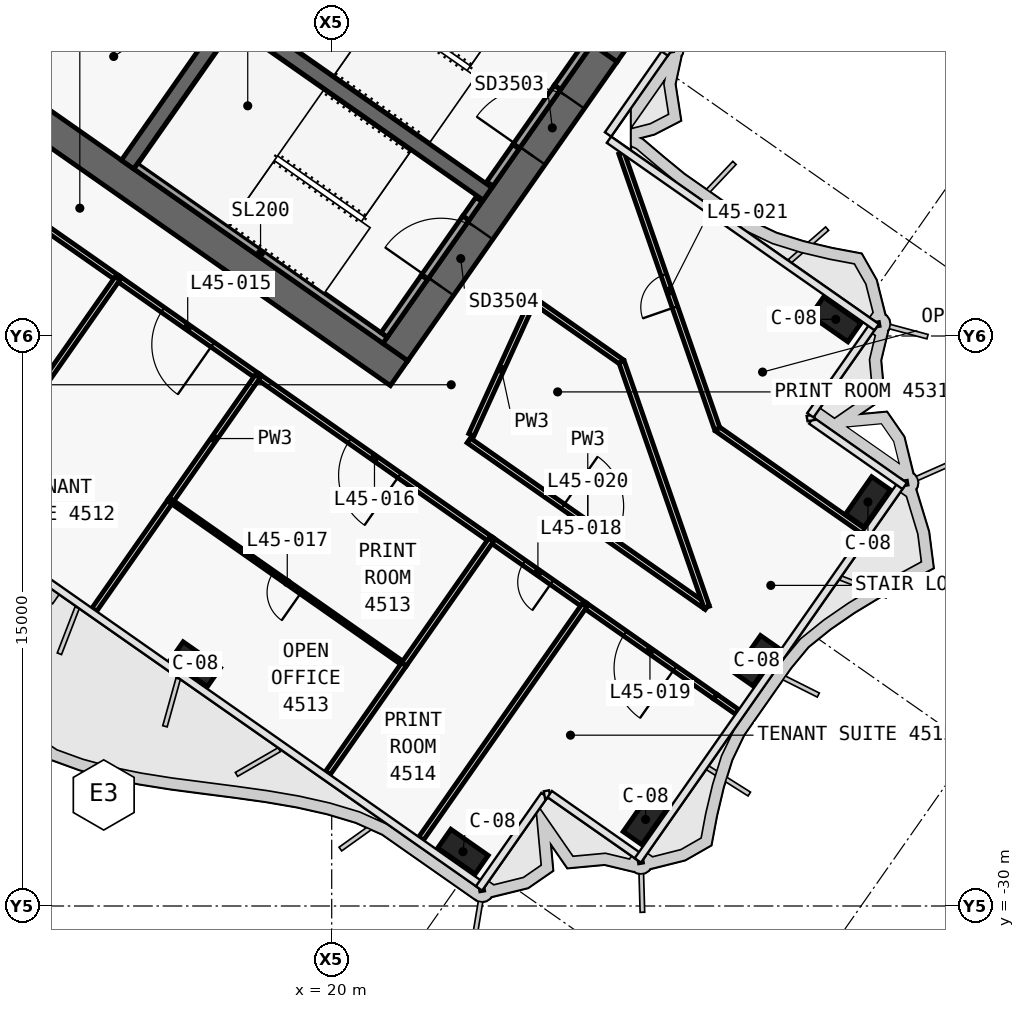
"""IFC4 building model, lengths in metres.
Left out: names, types, materials, properties, quantities, classifications, styles, units other than length and angle.
Written with IfcOpenShell. Run it as: python <this file> out.ifc"""

import sys

from ifc_helpers import new_model, si_unit, direction, frame, frame_2d, origin, origin_2d, place, context, subcontext, project, spatial, polyline, rectangle, outline, extrude, element, fill, save


model = new_model("IFC4")
c1 = context("Model", 3, precision=1e-05, world=origin(), true_north=direction((0.0, 1.0)))
c2 = subcontext(c1, "Body", "Model", "MODEL_VIEW")
j1 = project(units=[si_unit("LENGTHUNIT", "METRE"), si_unit("PLANEANGLEUNIT", "RADIAN")], contexts=[c1])
p1 = place(None, origin())
s1 = spatial("IfcSite", under=j1, at=p1, CompositionType="ELEMENT")
p2 = place(p1, origin())
s2 = spatial("IfcBuilding", under=s1, at=p2, CompositionType="ELEMENT")
p3 = place(p2, frame((0.0, 0.0, 194.4)))
s3 = spatial("IfcBuildingStorey", under=s2, at=p3, CompositionType="ELEMENT", Elevation=194.4)
p4 = place(p3, frame((-0.029, 11.984, 0.0), z_axis=(0.0, 0.0, 1.0), x_axis=(0.819151382952, -0.573577380837, 0.0)))
e1 = element("IfcWall", 1, at=p4, inside=s3, PredefinedType="SHEAR", context=c2, shape_type="SweptSolid", body=[
    extrude(outline(polyline([(33.898, 0.4), (-0.0, 0.4), (0.56, -0.4), (33.898, -0.4), (33.898, 0.4)])), origin(), (0.0, 0.0, 1.0), 3.9),
])
p5 = place(p3, frame((-0.029, -0.712, 0.0), z_axis=(0.0, 0.0, 1.0), x_axis=(0.819151758019, -0.573576845187, 0.0)))
e2 = element("IfcWall", 2, at=p5, inside=s3, PredefinedType="SHEAR", context=c2, shape_type="SweptSolid", body=[
    extrude(outline(polyline([(26.616, 0.4), (-0.0, 0.4), (0.56, -0.4), (26.616, -0.4), (26.616, 0.4)])), origin(), (0.0, 0.0, 1.0), 3.9),
])
p6 = place(p5, frame((6.666, 0.0, 0.0)))
e3 = element("IfcOpeningElement", 3, at=p6, cuts=e2, PredefinedType="OPENING", context=c2, shape_type="SweptSolid", body=[
    extrude(rectangle(XDim=1.5, YDim=2.1, at=frame_2d((0.75, 1.05))), frame((0.0, 0.41, 0.0), z_axis=(0.0, -1.0, 0.0), x_axis=(1.0, 0.0, 0.0)), (0.0, 0.0, 1.0), 0.82),
])
p7 = place(p5, frame((12.366, 0.0, 0.0)))
e4 = element("IfcOpeningElement", 4, at=p7, cuts=e2, PredefinedType="OPENING", context=c2, shape_type="SweptSolid", body=[
    extrude(rectangle(XDim=1.5, YDim=2.1, at=frame_2d((0.75, 1.05))), frame((0.0, 0.41, 0.0), z_axis=(0.0, -1.0, 0.0), x_axis=(1.0, 0.0, 0.0)), (0.0, 0.0, 1.0), 0.82),
])
p8 = place(p3, frame((21.675, -15.421, 0.0), z_axis=(0.0, 0.0, 1.0), x_axis=(0.573581815061, 0.819148278049, 0.0)))
e5 = element("IfcWall", 5, at=p8, inside=s3, PredefinedType="SHEAR", context=c2, shape_type="SweptSolid", body=[
    extrude(outline(polyline([(9.6, 0.4), (0.0, 0.4), (0.0, -0.4), (9.6, -0.4), (9.6, 0.4)])), origin(), (0.0, 0.0, 1.0), 3.9),
])
p9 = place(p8, frame((6.3, 0.0, 0.0)))
e6 = element("IfcOpeningElement", 6, at=p9, cuts=e5, PredefinedType="OPENING", context=c2, shape_type="SweptSolid", body=[
    extrude(rectangle(XDim=1.8, YDim=2.1, at=frame_2d((0.9, 1.05))), frame((0.0, 0.41, 0.0), z_axis=(0.0, -1.0, 0.0), x_axis=(1.0, 0.0, 0.0)), (0.0, 0.0, 1.0), 0.82),
])
p10 = place(p8, frame((2.1, 0.0, 0.0)))
e7 = element("IfcOpeningElement", 7, at=p10, cuts=e5, PredefinedType="OPENING", context=c2, shape_type="SweptSolid", body=[
    extrude(rectangle(XDim=1.8, YDim=2.1, at=frame_2d((0.9, 1.05))), frame((0.0, 0.41, 0.0), z_axis=(0.0, -1.0, 0.0), x_axis=(1.0, 0.0, 0.0)), (0.0, 0.0, 1.0), 0.82),
])
p11 = place(p3, frame((14.63, -10.488, 0.0), z_axis=(0.0, 0.0, 1.0), x_axis=(0.573611936273, 0.819127185829, 0.0)))
e8 = element("IfcWall", 8, at=p11, inside=s3, PredefinedType="SHEAR", context=c2, shape_type="SweptSolid", body=[
    extrude(outline(polyline([(0.0, 0.2), (0.0, -0.2), (4.6, -0.2), (4.6, 0.2), (0.0, 0.2)])), origin(), (0.0, 0.0, 1.0), 3.9),
])
p12 = place(p3, frame((2.638, 3.768, 0.0), z_axis=(0.0, 0.0, 1.0), x_axis=(0.81915267502, -0.573575535572, 0.0)))
e9 = element("IfcWall", 9, at=p12, inside=s3, PredefinedType="SHEAR", context=c2, shape_type="SweptSolid", body=[
    extrude(outline(polyline([(0.0, 0.2), (0.0, -0.2), (26.2, -0.2), (26.2, 0.2), (0.0, 0.2)])), origin(), (0.0, 0.0, 1.0), 3.9),
])
p13 = place(p12, frame((9.637, 0.0, 0.0)))
e10 = element("IfcOpeningElement", 10, at=p13, cuts=e9, PredefinedType="OPENING", context=c2, shape_type="SweptSolid", body=[
    extrude(rectangle(XDim=1.2, YDim=2.1, at=frame_2d((0.6, 1.05))), frame((0.0, 0.21, 0.0), z_axis=(0.0, -1.0, 0.0), x_axis=(1.0, 0.0, 0.0)), (0.0, 0.0, 1.0), 0.42),
])
p14 = place(p12, frame((11.812, 0.0, 0.0)))
e11 = element("IfcOpeningElement", 11, at=p14, cuts=e9, PredefinedType="OPENING", context=c2, shape_type="SweptSolid", body=[
    extrude(rectangle(XDim=1.2, YDim=2.1, at=frame_2d((0.6, 1.05))), frame((0.0, 0.21, 0.0), z_axis=(0.0, -1.0, 0.0), x_axis=(1.0, 0.0, 0.0)), (0.0, 0.0, 1.0), 0.42),
])
p15 = place(p12, frame((13.988, 0.0, 0.0)))
e12 = element("IfcOpeningElement", 12, at=p15, cuts=e9, PredefinedType="OPENING", context=c2, shape_type="SweptSolid", body=[
    extrude(rectangle(XDim=1.2, YDim=2.1, at=frame_2d((0.6, 1.05))), frame((0.0, 0.21, 0.0), z_axis=(0.0, -1.0, 0.0), x_axis=(1.0, 0.0, 0.0)), (0.0, 0.0, 1.0), 0.42),
])
p16 = place(p12, frame((16.262, 0.0, 0.0)))
e13 = element("IfcOpeningElement", 13, at=p16, cuts=e9, PredefinedType="OPENING", context=c2, shape_type="SweptSolid", body=[
    extrude(rectangle(XDim=1.0, YDim=2.1, at=frame_2d((0.5, 1.05))), frame((0.0, 0.21, 0.0), z_axis=(0.0, -1.0, 0.0), x_axis=(1.0, 0.0, 0.0)), (0.0, 0.0, 1.0), 0.42),
])
for number, where, z_axis, x_axis in (
    (14, (16.41, -23.637, 0.0), (0.0, 0.0, 1.0), (0.819, -0.574, 0.0)),
    (15, (23.455, -28.57, 0.0), (0.0, 0.0, 1.0), (0.819, -0.574, 0.0)),
    (16, (33.263, -14.562, 0.0), (0.0, 0.0, 1.0), (0.819, -0.574, 0.0)),
    (17, (28.26, -27.723, 0.0), (0.0, 0.0, 1.0), (0.574, 0.819, 0.0)),
    (18, (31.185, -23.545, 0.0), (0.0, 0.0, 1.0), (0.574, 0.819, 0.0)),
    (19, (34.11, -19.367, 0.0), (0.0, 0.0, 1.0), (0.574, 0.819, 0.0)),
):
    element("IfcColumn", number, at=place(p3, frame(where, z_axis=z_axis, x_axis=x_axis)), inside=s3, PredefinedType="COLUMN", context=c2, shape_type="SweptSolid", body=[
        extrude(rectangle(XDim=1.2, YDim=0.6, at=origin_2d()), origin(), (0.0, 0.0, 1.0), 3.9),
    ])
p17 = place(p3, frame((24.162, -10.998, 0.0), z_axis=(0.0, 0.0, 1.0), x_axis=(0.573612502218, 0.819126789514, 0.0)))
e20 = element("IfcWall", 20, at=p17, inside=s3, PredefinedType="SOLIDWALL", context=c2, shape_type="SweptSolid", body=[
    extrude(rectangle(XDim=1.2, YDim=0.2, at=frame_2d((0.6, 0.0))), origin(), (0.0, 0.0, 1.0), 3.62),
])
p18 = place(p3, frame((25.94, -8.458, 0.0), z_axis=(0.0, 0.0, 1.0), x_axis=(0.573619628835, 0.819121798889, 0.0)))
e21 = element("IfcWall", 21, at=p18, inside=s3, PredefinedType="SOLIDWALL", context=c2, shape_type="SweptSolid", body=[
    extrude(rectangle(XDim=1.25, YDim=0.2, at=frame_2d((0.625, 0.0))), origin(), (0.0, 0.0, 1.0), 3.62),
])
p19 = place(p3, frame((24.85, -10.014, 2.15), z_axis=(0.0, 0.0, 1.0), x_axis=(0.573505465124, 0.819201734296, 0.0)))
e22 = element("IfcWall", 22, at=p19, inside=s3, PredefinedType="SOLIDWALL", context=c2, shape_type="SweptSolid", body=[
    extrude(rectangle(XDim=1.9, YDim=0.2, at=frame_2d((0.95, 0.0))), origin(), (0.0, 0.0, 1.0), 1.47),
])
p20 = place(p3, frame((14.851, -10.521, 0.0), z_axis=(0.0, 0.0, 1.0), x_axis=(0.819141584393, -0.57359137434, 0.0)))
e23 = element("IfcWall", 23, at=p20, inside=s3, PredefinedType="SOLIDWALL", context=c2, shape_type="SweptSolid", body=[
    extrude(rectangle(XDim=8.0, YDim=0.2, at=frame_2d((4.0, 0.0))), origin(), (0.0, 0.0, 1.0), 3.62),
])
p21 = place(p3, frame((21.38, -14.97, 0.0), z_axis=(0.0, 0.0, 1.0), x_axis=(0.573559770908, 0.819163713305, 0.0)))
e24 = element("IfcWall", 24, at=p21, inside=s3, PredefinedType="SOLIDWALL", context=c2, shape_type="SweptSolid", body=[
    extrude(rectangle(XDim=1.85, YDim=0.2, at=frame_2d((0.925, 0.0))), origin(), (0.0, 0.0, 1.0), 3.62),
])
p22 = place(p3, frame((23.531, -11.898, 0.0), z_axis=(0.0, 0.0, 1.0), x_axis=(0.573708088123, 0.819059844958, 0.0)))
e25 = element("IfcWall", 25, at=p22, inside=s3, PredefinedType="SOLIDWALL", context=c2, shape_type="SweptSolid", body=[
    extrude(rectangle(XDim=0.6, YDim=0.2, at=frame_2d((0.3, 0.0))), origin(), (0.0, 0.0, 1.0), 3.62),
])
p23 = place(p3, frame((22.441, -13.455, 2.15), z_axis=(0.0, 0.0, 1.0), x_axis=(0.573591692345, 0.819141361715, 0.0)))
e26 = element("IfcWall", 26, at=p23, inside=s3, PredefinedType="SOLIDWALL", context=c2, shape_type="SweptSolid", body=[
    extrude(rectangle(XDim=1.9, YDim=0.2, at=frame_2d((0.95, 0.0))), origin(), (0.0, 0.0, 1.0), 1.47),
])
p24 = place(p3, frame((23.605, -17.749, 0.0), z_axis=(0.0, 0.0, 1.0), x_axis=(0.819164438106, -0.57355873574, 0.0)))
e27 = element("IfcWall", 27, at=p24, inside=s3, PredefinedType="PARTITIONING", context=c2, shape_type="SweptSolid", body=[
    extrude(rectangle(XDim=7.649, YDim=0.15, at=frame_2d((3.825, 0.0))), origin(), (0.0, 0.0, 1.0), 3.0),
])
p25 = place(p24, frame((3.024, 0.0, 0.0)))
e28 = element("IfcOpeningElement", 28, at=p25, cuts=e27, PredefinedType="OPENING", context=c2, shape_type="SweptSolid", body=[
    extrude(rectangle(XDim=1.6, YDim=2.1, at=frame_2d((0.8, 1.05))), frame((0.0, 0.085, 0.0), z_axis=(0.0, -1.0, 0.0), x_axis=(1.0, 0.0, 0.0)), (0.0, 0.0, 1.0), 0.17),
])
p26 = place(p3, frame((14.369, -13.479, 0.0), z_axis=(0.0, 0.0, 1.0), x_axis=(-0.819154371039, 0.573573113393, 0.0)))
e29 = element("IfcWall", 29, at=p26, inside=s3, PredefinedType="PARTITIONING", context=c2, shape_type="SweptSolid", body=[
    extrude(rectangle(XDim=10.502, YDim=0.15, at=frame_2d((5.251, 0.0))), origin(), (0.0, 0.0, 1.0), 3.0),
])
p27 = place(p26, frame((4.451, 0.0, 0.0)))
e30 = element("IfcOpeningElement", 30, at=p27, cuts=e29, PredefinedType="OPENING", context=c2, shape_type="SweptSolid", body=[
    extrude(rectangle(XDim=1.6, YDim=2.1, at=frame_2d((0.8, 1.05))), frame((0.0, 0.085, 0.0), z_axis=(0.0, -1.0, 0.0), x_axis=(1.0, 0.0, 0.0)), (0.0, 0.0, 1.0), 0.17),
])
p28 = place(p3, frame((18.055, -16.061, 0.0), z_axis=(0.0, 0.0, 1.0), x_axis=(-0.819183534257, 0.573531461389, 0.0)))
e31 = element("IfcWall", 31, at=p28, inside=s3, PredefinedType="PARTITIONING", context=c2, shape_type="SweptSolid", body=[
    extrude(rectangle(XDim=4.504, YDim=0.15, at=frame_2d((2.252, 0.0))), origin(), (0.0, 0.0, 1.0), 3.62),
])
p29 = place(p28, frame((1.452, 0.0, 0.0)))
e32 = element("IfcOpeningElement", 32, at=p29, cuts=e31, PredefinedType="OPENING", context=c2, shape_type="SweptSolid", body=[
    extrude(rectangle(XDim=1.6, YDim=2.1, at=frame_2d((0.8, 1.05))), frame((0.0, 0.085, 0.0), z_axis=(0.0, -1.0, 0.0), x_axis=(1.0, 0.0, 0.0)), (0.0, 0.0, 1.0), 0.17),
])
p30 = place(p3, frame((24.199, -20.362, 0.0), z_axis=(0.0, 0.0, 1.0), x_axis=(-0.819164661457, 0.573558416746, 0.0)))
e33 = element("IfcWall", 33, at=p30, inside=s3, PredefinedType="PARTITIONING", context=c2, shape_type="SweptSolid", body=[
    extrude(rectangle(XDim=7.504, YDim=0.15, at=frame_2d((3.752, 0.0))), origin(), (0.0, 0.0, 1.0), 3.0),
])
p31 = place(p30, frame((2.952, 0.0, 0.0)))
e34 = element("IfcOpeningElement", 34, at=p31, cuts=e33, PredefinedType="OPENING", context=c2, shape_type="SweptSolid", body=[
    extrude(rectangle(XDim=1.6, YDim=2.1, at=frame_2d((0.8, 1.05))), frame((0.0, 0.085, 0.0), z_axis=(0.0, -1.0, 0.0), x_axis=(1.0, 0.0, 0.0)), (0.0, 0.0, 1.0), 0.17),
])
p32 = place(p3, frame((26.656, -22.083, 0.0), z_axis=(0.0, 0.0, 1.0), x_axis=(-0.819155556475, 0.573571420397, 0.0)))
e35 = element("IfcWall", 35, at=p32, inside=s3, PredefinedType="PARTITIONING", context=c2, shape_type="SweptSolid", body=[
    extrude(rectangle(XDim=3.004, YDim=0.15, at=frame_2d((1.502, 0.0))), origin(), (0.0, 0.0, 1.0), 3.62),
])
p33 = place(p32, frame((1.052, 0.0, 0.0)))
e36 = element("IfcOpeningElement", 36, at=p33, cuts=e35, PredefinedType="OPENING", context=c2, shape_type="SweptSolid", body=[
    extrude(rectangle(XDim=0.9, YDim=2.1, at=frame_2d((0.45, 1.05))), frame((0.0, 0.085, 0.0), z_axis=(0.0, -1.0, 0.0), x_axis=(1.0, 0.0, 0.0)), (0.0, 0.0, 1.0), 0.17),
])
p34 = place(p3, frame((30.095, -24.491, 0.0), z_axis=(0.0, 0.0, 1.0), x_axis=(-0.819130917785, 0.573606606943, 0.0)))
e37 = element("IfcWall", 37, at=p34, inside=s3, PredefinedType="PARTITIONING", context=c2, shape_type="SweptSolid", body=[
    extrude(rectangle(XDim=4.202, YDim=0.15, at=frame_2d((2.101, 0.0))), origin(), (0.0, 0.0, 1.0), 3.0),
])
p35 = place(p34, frame((1.301, 0.0, 0.0)))
e38 = element("IfcOpeningElement", 38, at=p35, cuts=e37, PredefinedType="OPENING", context=c2, shape_type="SweptSolid", body=[
    extrude(rectangle(XDim=1.6, YDim=2.1, at=frame_2d((0.8, 1.05))), frame((0.0, 0.085, 0.0), z_axis=(0.0, -1.0, 0.0), x_axis=(1.0, 0.0, 0.0)), (0.0, 0.0, 1.0), 0.17),
])
p36 = place(p3, frame((33.996, -20.141, 0.0), z_axis=(0.0, 0.0, 1.0), x_axis=(-0.819151387458, 0.573577374402, 0.0)))
e39 = element("IfcWall", 39, at=p36, inside=s3, PredefinedType="PARTITIONING", context=c2, shape_type="SweptSolid", body=[
    extrude(rectangle(XDim=4.7, YDim=0.15, at=frame_2d((2.35, 0.0))), origin(), (0.0, 0.0, 1.0), 2.9),
])
p37 = place(p3, frame((30.146, -17.445, 0.0), z_axis=(0.0, 0.0, 1.0), x_axis=(-0.328073138075, 0.944652325501, 0.0)))
e40 = element("IfcWall", 40, at=p37, inside=s3, PredefinedType="PARTITIONING", context=c2, shape_type="SweptSolid", body=[
    extrude(rectangle(XDim=7.682, YDim=0.15, at=frame_2d((3.841, 0.0))), origin(), (0.0, 0.0, 1.0), 3.0),
])
p38 = place(p37, frame((3.391, 0.0, 0.0)))
e41 = element("IfcOpeningElement", 41, at=p38, cuts=e40, PredefinedType="OPENING", context=c2, shape_type="SweptSolid", body=[
    extrude(rectangle(XDim=0.9, YDim=2.1, at=frame_2d((0.45, 1.05))), frame((0.0, 0.085, 0.0), z_axis=(0.0, -1.0, 0.0), x_axis=(1.0, 0.0, 0.0)), (0.0, 0.0, 1.0), 0.17),
])
p39 = place(p3, frame((25.311, -14.061, 0.0), z_axis=(0.0, 0.0, 1.0), x_axis=(0.819179203532, -0.573537646978, 0.0)))
e42 = element("IfcWall", 42, at=p39, inside=s3, PredefinedType="PARTITIONING", context=c2, shape_type="SweptSolid", body=[
    extrude(rectangle(XDim=2.829, YDim=0.15, at=frame_2d((1.414, 0.0))), origin(), (0.0, 0.0, 1.0), 3.62),
])
p40 = place(p3, frame((27.628, -15.683, 0.0), z_axis=(0.0, 0.0, 1.0), x_axis=(0.328031182776, -0.944666895327, 0.0)))
e43 = element("IfcWall", 43, at=p40, inside=s3, PredefinedType="PARTITIONING", context=c2, shape_type="SweptSolid", body=[
    extrude(rectangle(XDim=6.83, YDim=0.15, at=frame_2d((3.415, 0.0))), origin(), (0.0, 0.0, 1.0), 3.0),
])
p41 = place(p3, frame((23.675, -17.601, 0.0), z_axis=(0.0, 0.0, 1.0), x_axis=(0.414941649999, 0.909848024176, 0.0)))
e44 = element("IfcWall", 44, at=p41, inside=s3, PredefinedType="PARTITIONING", context=c2, shape_type="SweptSolid", body=[
    extrude(rectangle(XDim=3.795, YDim=0.15, at=frame_2d((1.897, 0.0))), origin(), (0.0, 0.0, 1.0), 3.62),
])
p42 = place(p3, frame((14.367, -13.479, 0.0), z_axis=(0.0, 0.0, 1.0), x_axis=(-0.573598101901, -0.81913687348, 0.0)))
e45 = element("IfcWall", 45, at=p42, inside=s3, PredefinedType="PARTITIONING", context=c2, shape_type="SweptSolid", body=[
    extrude(rectangle(XDim=3.5, YDim=0.15, at=frame_2d((1.75, 0.0))), origin(), (0.0, 0.0, 1.0), 3.62),
])
p43 = place(p3, frame((15.76, -19.335, 0.0), z_axis=(0.0, 0.0, 1.0), x_axis=(-0.573607413343, -0.819130353093, 0.0)))
e46 = element("IfcWall", 46, at=p43, inside=s3, PredefinedType="PARTITIONING", context=c2, shape_type="SweptSolid", body=[
    extrude(rectangle(XDim=3.501, YDim=0.15, at=frame_2d((1.75, 0.0))), origin(), (0.0, 0.0, 1.0), 2.9),
])
p44 = place(p3, frame((18.054, -16.06, 0.0), z_axis=(0.0, 0.0, 1.0), x_axis=(-0.573589265117, -0.819143061341, 0.0)))
e47 = element("IfcWall", 47, at=p44, inside=s3, PredefinedType="PARTITIONING", context=c2, shape_type="SweptSolid", body=[
    extrude(rectangle(XDim=4.002, YDim=0.15, at=frame_2d((2.001, 0.0))), origin(), (0.0, 0.0, 1.0), 3.62),
])
p45 = place(p3, frame((21.902, -23.639, 0.0), z_axis=(0.0, 0.0, 1.0), x_axis=(-0.81915238829, 0.573575945067, 0.0)))
e48 = element("IfcWall", 48, at=p45, inside=s3, PredefinedType="PARTITIONING", context=c2, shape_type="SweptSolid", body=[
    extrude(rectangle(XDim=7.5, YDim=0.1, at=frame_2d((3.75, 0.0))), origin(), (0.0, 0.0, 1.0), 3.0),
])
p46 = place(p45, frame((3.3, 0.0, 0.0)))
e49 = element("IfcOpeningElement", 49, at=p46, cuts=e48, PredefinedType="OPENING", context=c2, shape_type="SweptSolid", body=[
    extrude(rectangle(XDim=0.9, YDim=2.1, at=frame_2d((0.45, 1.05))), frame((0.0, 0.06, 0.0), z_axis=(0.0, -1.0, 0.0), x_axis=(1.0, 0.0, 0.0)), (0.0, 0.0, 1.0), 0.12),
])
p47 = place(p3, frame((21.902, -23.639, 0.0), z_axis=(0.0, 0.0, 1.0), x_axis=(-0.573555999232, -0.819166354134, 0.0)))
e50 = element("IfcWall", 50, at=p47, inside=s3, PredefinedType="PARTITIONING", context=c2, shape_type="SweptSolid", body=[
    extrude(rectangle(XDim=3.499, YDim=0.15, at=frame_2d((1.75, 0.0))), origin(), (0.0, 0.0, 1.0), 2.9),
])
p48 = place(p3, frame((24.197, -20.361, 0.0), z_axis=(0.0, 0.0, 1.0), x_axis=(-0.573556557423, -0.819165963305, 0.0)))
e51 = element("IfcWall", 51, at=p48, inside=s3, PredefinedType="PARTITIONING", context=c2, shape_type="SweptSolid", body=[
    extrude(rectangle(XDim=4.0, YDim=0.15, at=frame_2d((2.0, 0.0))), origin(), (0.0, 0.0, 1.0), 3.62),
])
p49 = place(p3, frame((26.655, -22.082, 0.0), z_axis=(0.0, 0.0, 1.0), x_axis=(-0.573597787563, -0.819137093595, 0.0)))
e52 = element("IfcWall", 52, at=p49, inside=s3, PredefinedType="PARTITIONING", context=c2, shape_type="SweptSolid", body=[
    extrude(rectangle(XDim=7.5, YDim=0.15, at=frame_2d((3.75, 0.0))), origin(), (0.0, 0.0, 1.0), 2.9),
])
p50 = place(p3, frame((30.094, -24.49, 0.0), z_axis=(0.0, 0.0, 1.0), x_axis=(0.819150206117, -0.573579061523, 0.0)))
e53 = element("IfcWall", 53, at=p50, inside=s3, PredefinedType="PARTITIONING", context=c2, shape_type="SweptSolid", body=[
    extrude(rectangle(XDim=0.702, YDim=0.15, at=frame_2d((0.351, 0.0))), origin(), (0.0, 0.0, 1.0), 2.9),
])
p51 = place(p9, origin())
e54 = element("IfcDoor", 54, at=p51, inside=s3, OperationType="DOUBLE_DOOR_SINGLE_SWING", PredefinedType="DOOR", context=c2, shape_type="SweptSolid", body=[
    extrude(rectangle(XDim=1.8, YDim=2.1, at=frame_2d((0.9, 1.05))), frame((0.0, 0.025, 0.0), z_axis=(0.0, -1.0, 0.0), x_axis=(1.0, 0.0, 0.0)), (0.0, 0.0, 1.0), 0.05),
])
fill(e6, e54)
p52 = place(p10, origin())
e55 = element("IfcDoor", 55, at=p52, inside=s3, OperationType="DOUBLE_DOOR_SINGLE_SWING", PredefinedType="DOOR", context=c2, shape_type="SweptSolid", body=[
    extrude(rectangle(XDim=1.8, YDim=2.1, at=frame_2d((0.9, 1.05))), frame((0.0, 0.025, 0.0), z_axis=(0.0, -1.0, 0.0), x_axis=(1.0, 0.0, 0.0)), (0.0, 0.0, 1.0), 0.05),
])
fill(e7, e55)
p53 = place(p29, origin())
e56 = element("IfcDoor", 56, at=p53, inside=s3, OperationType="DOUBLE_DOOR_SINGLE_SWING", PredefinedType="DOOR", context=c2, shape_type="SweptSolid", body=[
    extrude(rectangle(XDim=1.6, YDim=2.1, at=frame_2d((0.8, 1.05))), frame((0.0, 0.025, 0.0), z_axis=(0.0, -1.0, 0.0), x_axis=(1.0, 0.0, 0.0)), (0.0, 0.0, 1.0), 0.05),
])
fill(e32, e56)
p54 = place(p31, origin())
e57 = element("IfcDoor", 57, at=p54, inside=s3, OperationType="DOUBLE_DOOR_SINGLE_SWING", PredefinedType="DOOR", context=c2, shape_type="SweptSolid", body=[
    extrude(rectangle(XDim=1.6, YDim=2.1, at=frame_2d((0.8, 1.05))), frame((0.0, 0.025, 0.0), z_axis=(0.0, -1.0, 0.0), x_axis=(1.0, 0.0, 0.0)), (0.0, 0.0, 1.0), 0.05),
])
fill(e34, e57)
p55 = place(p46, origin())
e58 = element("IfcDoor", 58, at=p55, inside=s3, OperationType="SINGLE_SWING_RIGHT", PredefinedType="DOOR", context=c2, shape_type="SweptSolid", body=[
    extrude(rectangle(XDim=0.9, YDim=2.1, at=frame_2d((0.45, 1.05))), frame((0.0, 0.025, 0.0), z_axis=(0.0, -1.0, 0.0), x_axis=(1.0, 0.0, 0.0)), (0.0, 0.0, 1.0), 0.05),
])
fill(e49, e58)
p56 = place(p33, origin())
e59 = element("IfcDoor", 59, at=p56, inside=s3, OperationType="SINGLE_SWING_LEFT", PredefinedType="DOOR", context=c2, shape_type="SweptSolid", body=[
    extrude(rectangle(XDim=0.9, YDim=2.1, at=frame_2d((0.45, 1.05))), frame((0.0, 0.025, 0.0), z_axis=(0.0, -1.0, 0.0), x_axis=(1.0, 0.0, 0.0)), (0.0, 0.0, 1.0), 0.05),
])
fill(e36, e59)
p57 = place(p35, origin())
e60 = element("IfcDoor", 60, at=p57, inside=s3, OperationType="DOUBLE_DOOR_SINGLE_SWING", PredefinedType="DOOR", context=c2, shape_type="SweptSolid", body=[
    extrude(rectangle(XDim=1.6, YDim=2.1, at=frame_2d((0.8, 1.05))), frame((0.0, 0.025, 0.0), z_axis=(0.0, -1.0, 0.0), x_axis=(1.0, 0.0, 0.0)), (0.0, 0.0, 1.0), 0.05),
])
fill(e38, e60)
p58 = place(p25, origin())
e61 = element("IfcDoor", 61, at=p58, inside=s3, OperationType="DOUBLE_DOOR_SINGLE_SWING", PredefinedType="DOOR", context=c2, shape_type="SweptSolid", body=[
    extrude(rectangle(XDim=1.6, YDim=2.1, at=frame_2d((0.8, 1.05))), frame((0.0, 0.025, 0.0), z_axis=(0.0, -1.0, 0.0), x_axis=(1.0, 0.0, 0.0)), (0.0, 0.0, 1.0), 0.05),
])
fill(e28, e61)
p59 = place(p38, origin())
e62 = element("IfcDoor", 62, at=p59, inside=s3, OperationType="SINGLE_SWING_LEFT", PredefinedType="DOOR", context=c2, shape_type="SweptSolid", body=[
    extrude(rectangle(XDim=0.9, YDim=2.1, at=frame_2d((0.45, 1.05))), frame((0.0, 0.025, 0.0), z_axis=(0.0, -1.0, 0.0), x_axis=(1.0, 0.0, 0.0)), (0.0, 0.0, 1.0), 0.05),
])
fill(e41, e62)
save(model, sys.argv[1])
